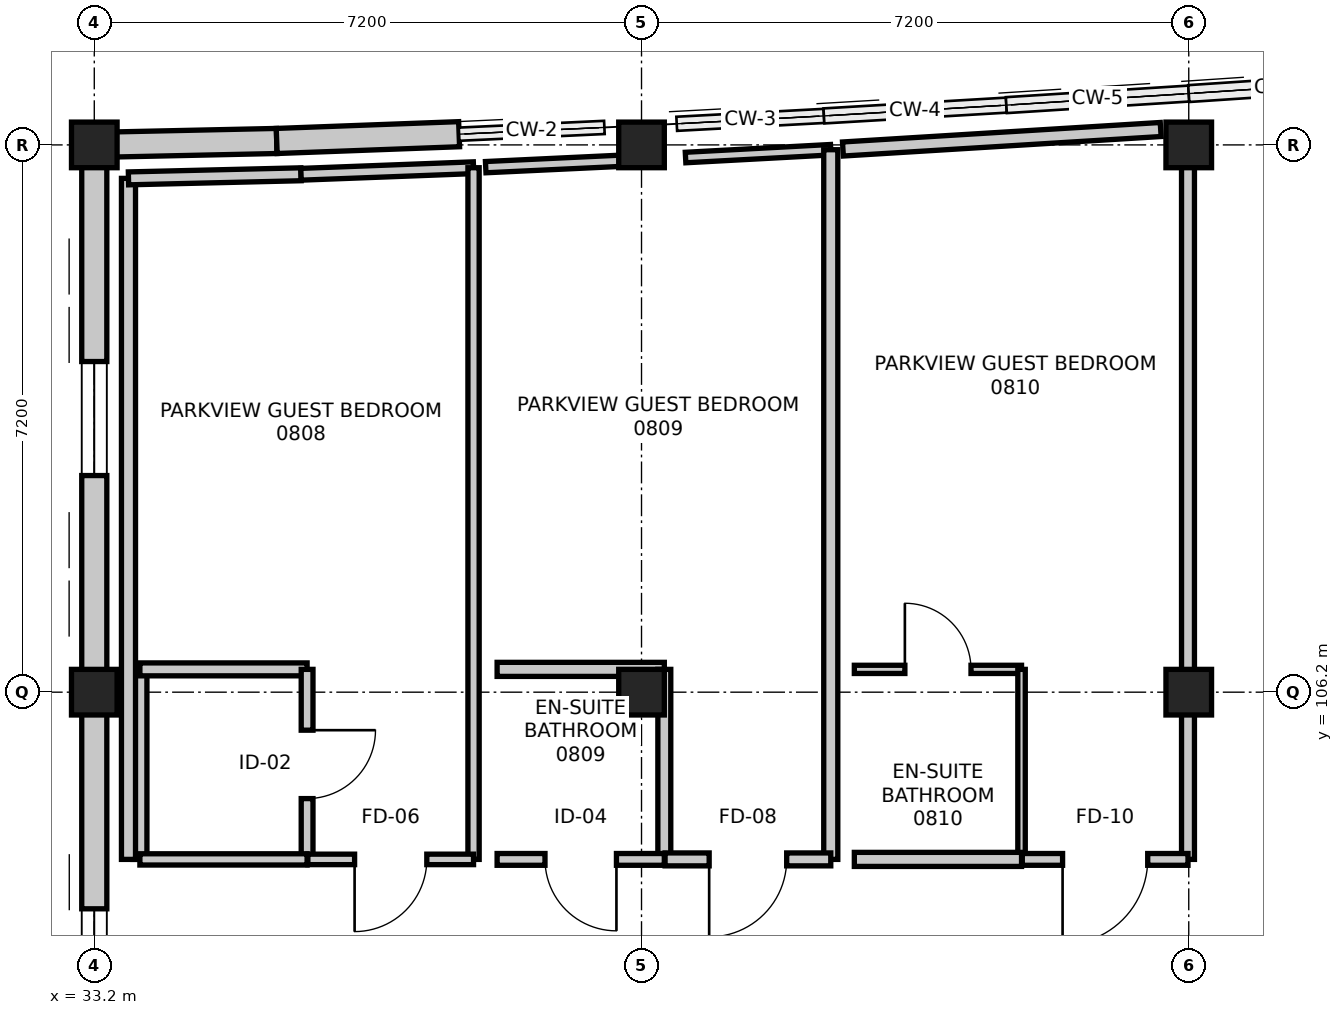
"""IFC4 building model, lengths in metres.
Left out: names, types, materials, properties, quantities, classifications, styles, units other than length and angle.
Written with IfcOpenShell. Run it as: python <this file> out.ifc"""

import sys

from ifc_helpers import new_model, si_unit, direction, frame, frame_2d, origin, origin_2d, place, context, subcontext, project, spatial, rectangle, extrude, element, fill, save


model = new_model("IFC4")
c1 = context("Model", 3, precision=1e-05, world=origin(), true_north=direction((0.0, 1.0)))
c2 = subcontext(c1, "Body", "Model", "MODEL_VIEW")
j1 = project(units=[si_unit("LENGTHUNIT", "METRE"), si_unit("PLANEANGLEUNIT", "RADIAN")], contexts=[c1])
p1 = place(None, origin())
s1 = spatial("IfcSite", under=j1, at=p1, CompositionType="ELEMENT")
p2 = place(p1, origin())
s2 = spatial("IfcBuilding", under=s1, at=p2, CompositionType="ELEMENT")
p3 = place(p2, frame((0.0, 0.0, 33.6)))
s3 = spatial("IfcBuildingStorey", under=s2, at=p3, CompositionType="ELEMENT", Elevation=33.6)
for number, where, z_axis, x_axis in (
    (1, (33.2, 106.2, 0.0), (0.0, 0.0, 1.0), (1.0, 0.0, 0.0)),
    (2, (33.2, 113.4, 0.0), (0.0, 0.0, 1.0), (1.0, 0.0, 0.0)),
    (3, (40.4, 106.2, 0.0), (0.0, 0.0, 1.0), (1.0, 0.0, 0.0)),
    (4, (40.4, 113.4, 0.0), (0.0, 0.0, 1.0), (1.0, 0.0, 0.0)),
    (5, (47.6, 106.2, 0.0), (0.0, 0.0, 1.0), (1.0, 0.0, 0.0)),
    (6, (47.6, 113.4, 0.0), (0.0, 0.0, 1.0), (1.0, 0.0, 0.0)),
):
    element("IfcColumn", number, at=place(p3, frame(where, z_axis=z_axis, x_axis=x_axis)), inside=s3, PredefinedType="COLUMN", context=c2, shape_type="SweptSolid", body=[
        extrude(rectangle(XDim=0.6, YDim=0.6, at=origin_2d()), origin(), (0.0, 0.0, 1.0), 3.6),
    ])
p4 = place(p3, frame((33.2, 113.4, 0.0), z_axis=(0.0, 0.0, 1.0), x_axis=(0.999767568547, 0.021559426766, 0.0)))
e7 = element("IfcWall", 7, at=p4, inside=s3, PredefinedType="STANDARD", context=c2, shape_type="SweptSolid", body=[
    extrude(rectangle(XDim=2.401, YDim=0.33, at=frame_2d((1.2, 0.0))), origin(), (0.0, 0.0, 1.0), 2.745),
])
p5 = place(p3, frame((35.6, 113.452, 0.0), z_axis=(0.0, 0.0, 1.0), x_axis=(0.99930757318, 0.037207179225, 0.0)))
e8 = element("IfcWall", 8, at=p5, inside=s3, PredefinedType="STANDARD", context=c2, shape_type="SweptSolid", body=[
    extrude(rectangle(XDim=2.402, YDim=0.33, at=frame_2d((1.201, 0.0))), origin(), (0.0, 0.0, 1.0), 2.745),
])
p6 = place(p3, frame((33.2, 99.0, 0.0), z_axis=(0.0, 0.0, 1.0), x_axis=(0.0, 1.0, 0.0)))
e9 = element("IfcWall", 9, at=p6, inside=s3, PredefinedType="STANDARD", context=c2, shape_type="SweptSolid", body=[
    extrude(rectangle(XDim=7.2, YDim=0.33, at=frame_2d((3.6, 0.0))), origin(), (0.0, 0.0, 1.0), 2.695),
])
p7 = place(p6, frame((2.85, 0.0, 0.75)))
e10 = element("IfcOpeningElement", 10, at=p7, cuts=e9, PredefinedType="OPENING", context=c2, shape_type="SweptSolid", body=[
    extrude(rectangle(XDim=1.5, YDim=1.5, at=frame_2d((0.75, 0.75))), frame((0.0, 0.175, 0.0), z_axis=(0.0, -1.0, 0.0), x_axis=(1.0, 0.0, 0.0)), (0.0, 0.0, 1.0), 0.35),
])
p8 = place(p3, frame((33.2, 106.2, 0.0), z_axis=(0.0, 0.0, 1.0), x_axis=(0.0, 1.0, 0.0)))
e11 = element("IfcWall", 11, at=p8, inside=s3, PredefinedType="STANDARD", context=c2, shape_type="SweptSolid", body=[
    extrude(rectangle(XDim=7.2, YDim=0.33, at=frame_2d((3.6, 0.0))), origin(), (0.0, 0.0, 1.0), 2.695),
])
p9 = place(p8, frame((2.85, 0.0, 0.75)))
e12 = element("IfcOpeningElement", 12, at=p9, cuts=e11, PredefinedType="OPENING", context=c2, shape_type="SweptSolid", body=[
    extrude(rectangle(XDim=1.5, YDim=1.5, at=frame_2d((0.75, 0.75))), frame((0.0, 0.175, 0.0), z_axis=(0.0, -1.0, 0.0), x_axis=(1.0, 0.0, 0.0)), (0.0, 0.0, 1.0), 0.35),
])
p10 = place(p3, frame((33.8, 104.0, 0.0), z_axis=(0.0, 0.0, 1.0), x_axis=(0.0, 1.0, 0.0)))
e13 = element("IfcWall", 13, at=p10, inside=s3, PredefinedType="PARTITIONING", context=c2, shape_type="SweptSolid", body=[
    extrude(rectangle(XDim=2.5, YDim=0.185, at=frame_2d((1.25, 0.0))), origin(), (0.0, 0.0, 1.0), 2.745),
])
p11 = place(p3, frame((33.8, 106.5, 0.0), z_axis=(0.0, 0.0, 1.0), x_axis=(1.0, 0.0, 0.0)))
e14 = element("IfcWall", 14, at=p11, inside=s3, PredefinedType="PARTITIONING", context=c2, shape_type="SweptSolid", body=[
    extrude(rectangle(XDim=2.2, YDim=0.17, at=frame_2d((1.1, 0.0))), origin(), (0.0, 0.0, 1.0), 2.745),
])
p12 = place(p3, frame((36.0, 106.5, 0.0), z_axis=(0.0, 0.0, 1.0), x_axis=(0.0, -1.0, 0.0)))
e15 = element("IfcWall", 15, at=p12, inside=s3, PredefinedType="PARTITIONING", context=c2, shape_type="SweptSolid", body=[
    extrude(rectangle(XDim=2.5, YDim=0.155, at=frame_2d((1.25, 0.0))), origin(), (0.0, 0.0, 1.0), 2.745),
])
p13 = place(p12, frame((0.8, 0.0, 0.0)))
e16 = element("IfcOpeningElement", 16, at=p13, cuts=e15, PredefinedType="OPENING", context=c2, shape_type="SweptSolid", body=[
    extrude(rectangle(XDim=0.9, YDim=2.08, at=frame_2d((0.45, 1.04))), frame((0.0, 0.087, 0.0), z_axis=(0.0, -1.0, 0.0), x_axis=(1.0, 0.0, 0.0)), (0.0, 0.0, 1.0), 0.175),
])
p14 = place(p3, frame((36.0, 104.0, 0.0), z_axis=(0.0, 0.0, 1.0), x_axis=(-1.0, 0.0, 0.0)))
e17 = element("IfcWall", 17, at=p14, inside=s3, PredefinedType="PARTITIONING", context=c2, shape_type="SweptSolid", body=[
    extrude(rectangle(XDim=2.2, YDim=0.148, at=frame_2d((1.1, 0.0))), origin(), (0.0, 0.0, 1.0), 3.36),
])
p15 = place(p3, frame((33.65, 104.0, 0.0), z_axis=(0.0, 0.0, 1.0), x_axis=(0.0, 1.0, 0.0)))
e18 = element("IfcWall", 18, at=p15, inside=s3, PredefinedType="PARTITIONING", context=c2, shape_type="SweptSolid", body=[
    extrude(rectangle(XDim=8.96, YDim=0.185, at=frame_2d((4.48, 0.0))), origin(), (0.0, 0.0, 1.0), 2.745),
])
p16 = place(p3, frame((33.65, 112.96, 0.0), z_axis=(0.0, 0.0, 1.0), x_axis=(0.999717647588, 0.023761841269, 0.0)))
e19 = element("IfcWall", 19, at=p16, inside=s3, PredefinedType="PARTITIONING", context=c2, shape_type="SweptSolid", body=[
    extrude(rectangle(XDim=2.271, YDim=0.17, at=frame_2d((1.135, 0.0))), origin(), (0.0, 0.0, 1.0), 3.36),
])
p17 = place(p3, frame((35.92, 113.014, 0.0), z_axis=(0.0, 0.0, 1.0), x_axis=(0.999280101676, 0.037937822746, 0.0)))
e20 = element("IfcWall", 20, at=p17, inside=s3, PredefinedType="PARTITIONING", context=c2, shape_type="SweptSolid", body=[
    extrude(rectangle(XDim=2.272, YDim=0.155, at=frame_2d((1.136, 0.0))), origin(), (0.0, 0.0, 1.0), 3.36),
])
p18 = place(p3, frame((38.19, 113.1, 0.0), z_axis=(0.0, 0.0, 1.0), x_axis=(0.0, -1.0, 0.0)))
e21 = element("IfcWall", 21, at=p18, inside=s3, PredefinedType="PARTITIONING", context=c2, shape_type="SweptSolid", body=[
    extrude(rectangle(XDim=9.1, YDim=0.148, at=frame_2d((4.55, 0.0))), origin(), (0.0, 0.0, 1.0), 2.745),
])
p19 = place(p3, frame((38.19, 104.0, 0.0), z_axis=(0.0, 0.0, 1.0), x_axis=(-1.0, 0.0, 0.0)))
e22 = element("IfcWall", 22, at=p19, inside=s3, PredefinedType="PARTITIONING", context=c2, shape_type="SweptSolid", body=[
    extrude(rectangle(XDim=2.18, YDim=0.138, at=frame_2d((1.09, 0.0))), origin(), (0.0, 0.0, 1.0), 3.36),
])
p20 = place(p19, frame((0.615, 0.0, 0.0)))
e23 = element("IfcOpeningElement", 23, at=p20, cuts=e22, PredefinedType="OPENING", context=c2, shape_type="SweptSolid", body=[
    extrude(rectangle(XDim=0.95, YDim=2.1, at=frame_2d((0.475, 1.05))), frame((0.0, 0.079, 0.0), z_axis=(0.0, -1.0, 0.0), x_axis=(1.0, 0.0, 0.0)), (0.0, 0.0, 1.0), 0.158),
])
p21 = place(p3, frame((38.5, 106.5, 0.0), z_axis=(0.0, 0.0, 1.0), x_axis=(1.0, 0.0, 0.0)))
e24 = element("IfcWall", 24, at=p21, inside=s3, PredefinedType="PARTITIONING", context=c2, shape_type="SweptSolid", body=[
    extrude(rectangle(XDim=2.2, YDim=0.185, at=frame_2d((1.1, 0.0))), origin(), (0.0, 0.0, 1.0), 2.695),
])
p22 = place(p3, frame((40.7, 106.5, 0.0), z_axis=(0.0, 0.0, 1.0), x_axis=(0.0, -1.0, 0.0)))
e25 = element("IfcWall", 25, at=p22, inside=s3, PredefinedType="PARTITIONING", context=c2, shape_type="SweptSolid", body=[
    extrude(rectangle(XDim=2.5, YDim=0.17, at=frame_2d((1.25, 0.0))), origin(), (0.0, 0.0, 1.0), 2.695),
])
p23 = place(p3, frame((40.7, 104.0, 0.0), z_axis=(0.0, 0.0, 1.0), x_axis=(-1.0, 0.0, 0.0)))
e26 = element("IfcWall", 26, at=p23, inside=s3, PredefinedType="PARTITIONING", context=c2, shape_type="SweptSolid", body=[
    extrude(rectangle(XDim=2.2, YDim=0.155, at=frame_2d((1.1, 0.0))), origin(), (0.0, 0.0, 1.0), 2.695),
])
p24 = place(p23, frame((0.63, 0.0, 0.0)))
e27 = element("IfcOpeningElement", 27, at=p24, cuts=e26, PredefinedType="OPENING", context=c2, shape_type="SweptSolid", body=[
    extrude(rectangle(XDim=0.94, YDim=2.12, at=frame_2d((0.47, 1.06))), frame((0.0, 0.087, 0.0), z_axis=(0.0, -1.0, 0.0), x_axis=(1.0, 0.0, 0.0)), (0.0, 0.0, 1.0), 0.175),
])
p25 = place(p3, frame((38.35, 113.107, 0.0), z_axis=(0.0, 0.0, 1.0), x_axis=(0.998883966437, 0.047231574132, 0.0)))
e28 = element("IfcWall", 28, at=p25, inside=s3, PredefinedType="PARTITIONING", context=c2, shape_type="SweptSolid", body=[
    extrude(rectangle(XDim=1.913, YDim=0.148, at=frame_2d((0.956, 0.0))), origin(), (0.0, 0.0, 1.0), 2.745),
])
p26 = place(p3, frame((40.979, 113.234, 0.0), z_axis=(0.0, 0.0, 1.0), x_axis=(0.998555811423, 0.053724216819, 0.0)))
e29 = element("IfcWall", 29, at=p26, inside=s3, PredefinedType="PARTITIONING", context=c2, shape_type="SweptSolid", body=[
    extrude(rectangle(XDim=1.913, YDim=0.138, at=frame_2d((0.957, 0.0))), origin(), (0.0, 0.0, 1.0), 2.745),
])
p27 = place(p3, frame((42.89, 113.337, 0.0), z_axis=(0.0, 0.0, 1.0), x_axis=(0.0, -1.0, 0.0)))
e30 = element("IfcWall", 30, at=p27, inside=s3, PredefinedType="PARTITIONING", context=c2, shape_type="SweptSolid", body=[
    extrude(rectangle(XDim=9.337, YDim=0.185, at=frame_2d((4.668, 0.0))), origin(), (0.0, 0.0, 1.0), 2.745),
])
p28 = place(p3, frame((42.89, 104.0, 0.0), z_axis=(0.0, 0.0, 1.0), x_axis=(-1.0, 0.0, 0.0)))
e31 = element("IfcWall", 31, at=p28, inside=s3, PredefinedType="PARTITIONING", context=c2, shape_type="SweptSolid", body=[
    extrude(rectangle(XDim=2.18, YDim=0.17, at=frame_2d((1.09, 0.0))), origin(), (0.0, 0.0, 1.0), 3.36),
])
p29 = place(p28, frame((0.58, 0.0, 0.0)))
e32 = element("IfcOpeningElement", 32, at=p29, cuts=e31, PredefinedType="OPENING", context=c2, shape_type="SweptSolid", body=[
    extrude(rectangle(XDim=1.02, YDim=2.15, at=frame_2d((0.51, 1.075))), frame((0.0, 0.095, 0.0), z_axis=(0.0, -1.0, 0.0), x_axis=(1.0, 0.0, 0.0)), (0.0, 0.0, 1.0), 0.19),
])
p30 = place(p3, frame((43.2, 106.5, 0.0), z_axis=(0.0, 0.0, 1.0), x_axis=(1.0, 0.0, 0.0)))
e33 = element("IfcWall", 33, at=p30, inside=s3, PredefinedType="PARTITIONING", context=c2, shape_type="SweptSolid", body=[
    extrude(rectangle(XDim=2.2, YDim=0.108, at=frame_2d((1.1, 0.0))), origin(), (0.0, 0.0, 1.0), 3.36),
])
p31 = place(p30, frame((0.665, 0.0, 0.0)))
e34 = element("IfcOpeningElement", 34, at=p31, cuts=e33, PredefinedType="OPENING", context=c2, shape_type="SweptSolid", body=[
    extrude(rectangle(XDim=0.87, YDim=2.07, at=frame_2d((0.435, 1.035))), frame((0.0, 0.064, 0.0), z_axis=(0.0, -1.0, 0.0), x_axis=(1.0, 0.0, 0.0)), (0.0, 0.0, 1.0), 0.128),
])
p32 = place(p3, frame((45.4, 106.5, 0.0), z_axis=(0.0, 0.0, 1.0), x_axis=(0.0, -1.0, 0.0)))
e35 = element("IfcWall", 35, at=p32, inside=s3, PredefinedType="PARTITIONING", context=c2, shape_type="SweptSolid", body=[
    extrude(rectangle(XDim=2.5, YDim=0.098, at=frame_2d((1.25, 0.0))), origin(), (0.0, 0.0, 1.0), 2.745),
])
p33 = place(p3, frame((45.4, 104.0, 0.0), z_axis=(0.0, 0.0, 1.0), x_axis=(-1.0, 0.0, 0.0)))
e36 = element("IfcWall", 36, at=p33, inside=s3, PredefinedType="PARTITIONING", context=c2, shape_type="SweptSolid", body=[
    extrude(rectangle(XDim=2.2, YDim=0.185, at=frame_2d((1.1, 0.0))), origin(), (0.0, 0.0, 1.0), 3.36),
])
p34 = place(p3, frame((43.05, 113.346, 0.0), z_axis=(0.0, 0.0, 1.0), x_axis=(0.998125369777, 0.061202501651, 0.0)))
e37 = element("IfcWall", 37, at=p34, inside=s3, PredefinedType="PARTITIONING", context=c2, shape_type="SweptSolid", body=[
    extrude(rectangle(XDim=4.188, YDim=0.185, at=frame_2d((2.094, 0.0))), origin(), (0.0, 0.0, 1.0), 2.745),
])
p35 = place(p3, frame((47.59, 113.265, 0.0), z_axis=(0.0, 0.0, 1.0), x_axis=(0.0, -1.0, 0.0)))
e38 = element("IfcWall", 38, at=p35, inside=s3, PredefinedType="PARTITIONING", context=c2, shape_type="SweptSolid", body=[
    extrude(rectangle(XDim=9.265, YDim=0.17, at=frame_2d((4.632, 0.0))), origin(), (0.0, 0.0, 1.0), 2.695),
])
p36 = place(p3, frame((47.59, 104.0, 0.0), z_axis=(0.0, 0.0, 1.0), x_axis=(-1.0, 0.0, 0.0)))
e39 = element("IfcWall", 39, at=p36, inside=s3, PredefinedType="PARTITIONING", context=c2, shape_type="SweptSolid", body=[
    extrude(rectangle(XDim=2.18, YDim=0.155, at=frame_2d((1.09, 0.0))), origin(), (0.0, 0.0, 1.0), 2.695),
])
p37 = place(p36, frame((0.53, 0.0, 0.0)))
e40 = element("IfcOpeningElement", 40, at=p37, cuts=e39, PredefinedType="OPENING", context=c2, shape_type="SweptSolid", body=[
    extrude(rectangle(XDim=1.12, YDim=2.2, at=frame_2d((0.56, 1.1))), frame((0.0, 0.087, 0.0), z_axis=(0.0, -1.0, 0.0), x_axis=(1.0, 0.0, 0.0)), (0.0, 0.0, 1.0), 0.175),
])
p38 = place(p7, origin())
e41 = element("IfcWindow", 41, at=p38, inside=s3, PartitioningType="SINGLE_PANEL", PredefinedType="WINDOW", context=c2, shape_type="SweptSolid", body=[
    extrude(rectangle(XDim=1.5, YDim=1.5, at=frame_2d((0.75, 0.75))), frame((0.0, 0.03, 0.0), z_axis=(0.0, -1.0, 0.0), x_axis=(1.0, 0.0, 0.0)), (0.0, 0.0, 1.0), 0.06),
])
fill(e10, e41)
p39 = place(p9, origin())
e42 = element("IfcWindow", 42, at=p39, inside=s3, PartitioningType="SINGLE_PANEL", PredefinedType="WINDOW", context=c2, shape_type="SweptSolid", body=[
    extrude(rectangle(XDim=1.5, YDim=1.5, at=frame_2d((0.75, 0.75))), frame((0.0, 0.03, 0.0), z_axis=(0.0, -1.0, 0.0), x_axis=(1.0, 0.0, 0.0)), (0.0, 0.0, 1.0), 0.06),
])
fill(e12, e42)
p40 = place(p13, origin())
e43 = element("IfcDoor", 43, at=p40, inside=s3, OperationType="SINGLE_SWING_LEFT", PredefinedType="DOOR", context=c2, shape_type="SweptSolid", body=[
    extrude(rectangle(XDim=0.9, YDim=2.08, at=frame_2d((0.45, 1.04))), frame((0.0, 0.025, 0.0), z_axis=(0.0, -1.0, 0.0), x_axis=(1.0, 0.0, 0.0)), (0.0, 0.0, 1.0), 0.05),
])
fill(e16, e43)
p41 = place(p20, origin())
e44 = element("IfcDoor", 44, at=p41, inside=s3, OperationType="SINGLE_SWING_RIGHT", PredefinedType="DOOR", context=c2, shape_type="SweptSolid", body=[
    extrude(rectangle(XDim=0.95, YDim=2.1, at=frame_2d((0.475, 1.05))), frame((0.0, 0.025, 0.0), z_axis=(0.0, -1.0, 0.0), x_axis=(1.0, 0.0, 0.0)), (0.0, 0.0, 1.0), 0.05),
])
fill(e23, e44)
p42 = place(p24, origin())
e45 = element("IfcDoor", 45, at=p42, inside=s3, OperationType="SINGLE_SWING_LEFT", PredefinedType="DOOR", context=c2, shape_type="SweptSolid", body=[
    extrude(rectangle(XDim=0.94, YDim=2.12, at=frame_2d((0.47, 1.06))), frame((0.0, 0.025, 0.0), z_axis=(0.0, -1.0, 0.0), x_axis=(1.0, 0.0, 0.0)), (0.0, 0.0, 1.0), 0.05),
])
fill(e27, e45)
p43 = place(p29, origin())
e46 = element("IfcDoor", 46, at=p43, inside=s3, OperationType="SINGLE_SWING_RIGHT", PredefinedType="DOOR", context=c2, shape_type="SweptSolid", body=[
    extrude(rectangle(XDim=1.02, YDim=2.15, at=frame_2d((0.51, 1.075))), frame((0.0, 0.025, 0.0), z_axis=(0.0, -1.0, 0.0), x_axis=(1.0, 0.0, 0.0)), (0.0, 0.0, 1.0), 0.05),
])
fill(e32, e46)
p44 = place(p31, origin())
e47 = element("IfcDoor", 47, at=p44, inside=s3, OperationType="SINGLE_SWING_LEFT", PredefinedType="DOOR", context=c2, shape_type="SweptSolid", body=[
    extrude(rectangle(XDim=0.87, YDim=2.07, at=frame_2d((0.435, 1.035))), frame((0.0, 0.025, 0.0), z_axis=(0.0, -1.0, 0.0), x_axis=(1.0, 0.0, 0.0)), (0.0, 0.0, 1.0), 0.05),
])
fill(e34, e47)
p45 = place(p37, origin())
e48 = element("IfcDoor", 48, at=p45, inside=s3, OperationType="SINGLE_SWING_RIGHT", PredefinedType="DOOR", context=c2, shape_type="SweptSolid", body=[
    extrude(rectangle(XDim=1.12, YDim=2.2, at=frame_2d((0.56, 1.1))), frame((0.0, 0.025, 0.0), z_axis=(0.0, -1.0, 0.0), x_axis=(1.0, 0.0, 0.0)), (0.0, 0.0, 1.0), 0.05),
])
fill(e40, e48)
save(model, sys.argv[1])
